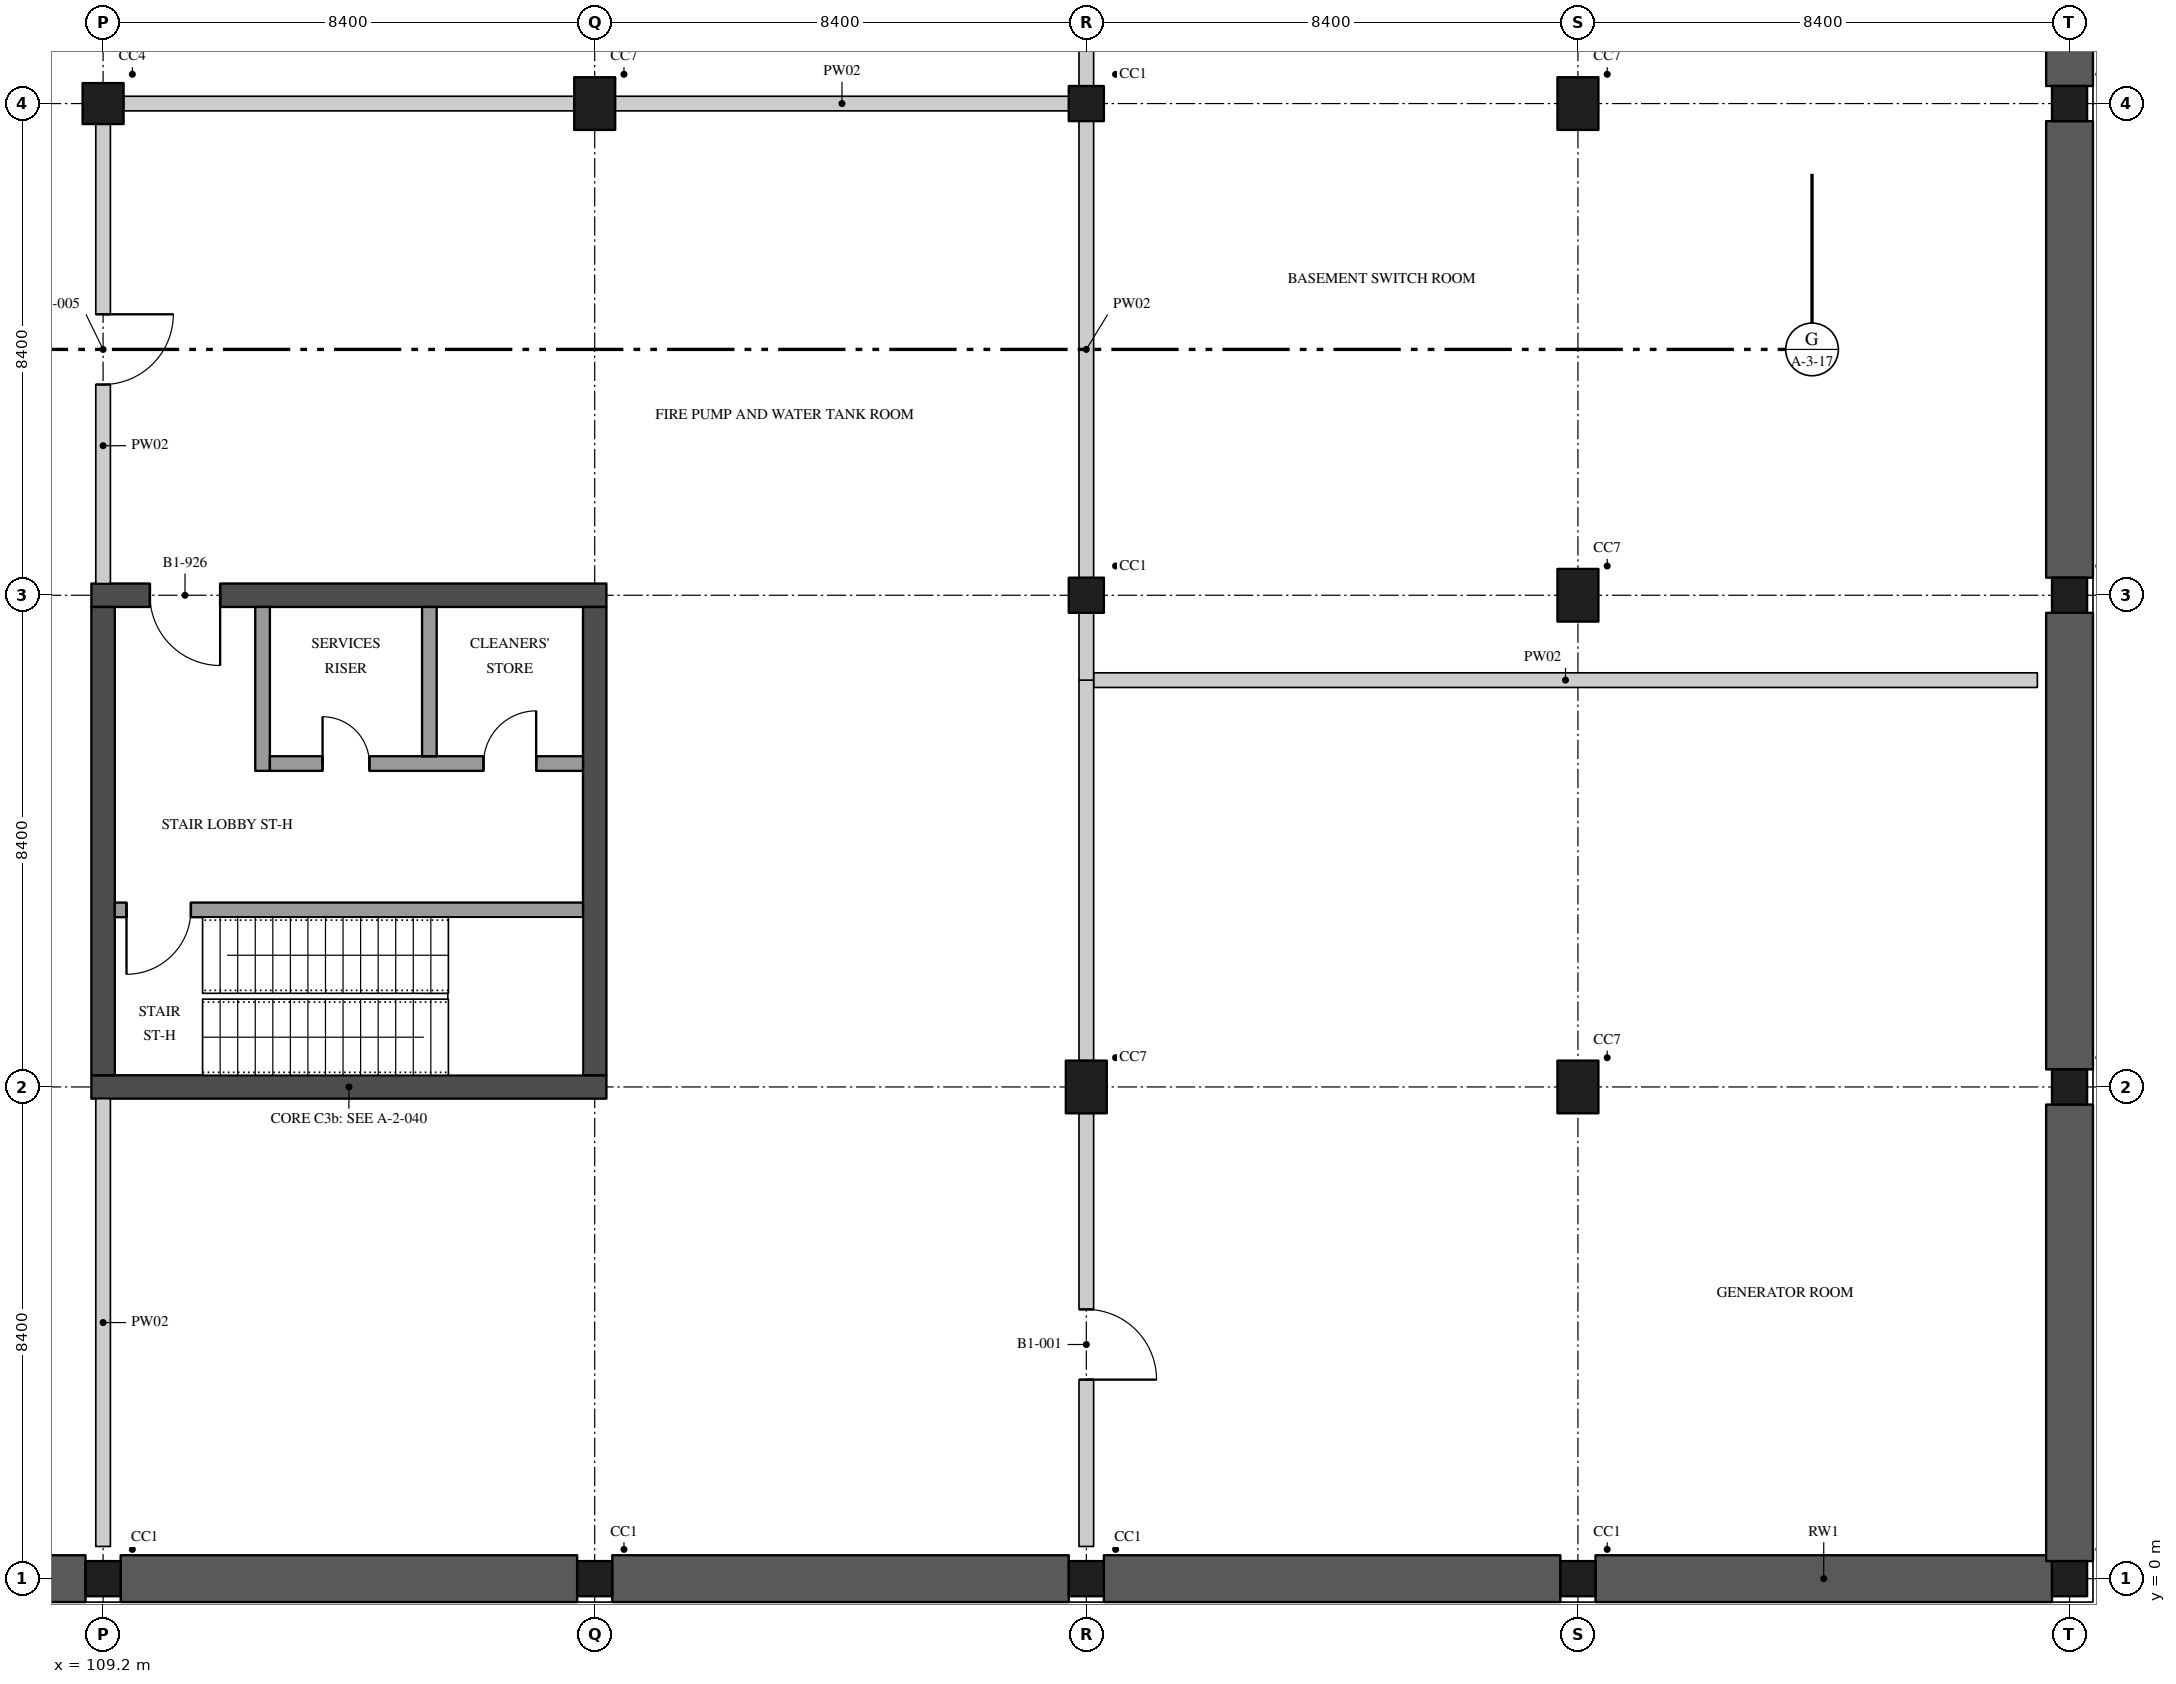
"""IFC4 building model, lengths in metres.
Left out: names, types, materials, properties, quantities, classifications, styles, units other than length and angle.
Written with IfcOpenShell. Run it as: python <this file> out.ifc"""

import sys

from ifc_helpers import new_model, si_unit, direction, frame, frame_2d, origin, origin_2d, place, context, subcontext, project, spatial, rectangle, extrude, element, fill, save


model = new_model("IFC4")
c1 = context("Model", 3, precision=1e-05, world=origin(), true_north=direction((0.0, 1.0)))
c2 = subcontext(c1, "Body", "Model", "MODEL_VIEW")
j1 = project(units=[si_unit("LENGTHUNIT", "METRE"), si_unit("PLANEANGLEUNIT", "RADIAN")], contexts=[c1])
p1 = place(None, origin())
s1 = spatial("IfcSite", under=j1, at=p1, CompositionType="ELEMENT")
p2 = place(p1, origin())
s2 = spatial("IfcBuilding", under=s1, at=p2, CompositionType="ELEMENT")
p3 = place(p2, frame((0.0, 0.0, -4.5)))
s3 = spatial("IfcBuildingStorey", under=s2, at=p3, CompositionType="ELEMENT", Elevation=-4.5)
p4 = place(p3, frame((109.2, 0.0, 0.0), z_axis=(0.0, 0.0, 1.0), x_axis=(1.0, 0.0, 0.0)))
e1 = element("IfcColumn", 1, at=p4, inside=s3, PredefinedType="COLUMN", context=c2, shape_type="SweptSolid", body=[
    extrude(rectangle(XDim=0.6, YDim=0.6, at=origin_2d()), origin(), (0.0, 0.0, 1.0), 4.05),
])
p5 = place(p3, frame((109.2, 25.2, 0.0), z_axis=(0.0, 0.0, 1.0), x_axis=(1.0, 0.0, 0.0)))
e2 = element("IfcColumn", 2, at=p5, inside=s3, PredefinedType="COLUMN", context=c2, shape_type="SweptSolid", body=[
    extrude(rectangle(XDim=0.7, YDim=0.7, at=origin_2d()), origin(), (0.0, 0.0, 1.0), 4.05),
])
p6 = place(p3, frame((117.6, 0.0, 0.0), z_axis=(0.0, 0.0, 1.0), x_axis=(1.0, 0.0, 0.0)))
e3 = element("IfcColumn", 3, at=p6, inside=s3, PredefinedType="COLUMN", context=c2, shape_type="SweptSolid", body=[
    extrude(rectangle(XDim=0.6, YDim=0.6, at=origin_2d()), origin(), (0.0, 0.0, 1.0), 4.05),
])
p7 = place(p3, frame((117.6, 25.2, 0.0), z_axis=(0.0, 0.0, 1.0), x_axis=(1.0, 0.0, 0.0)))
e4 = element("IfcColumn", 4, at=p7, inside=s3, PredefinedType="COLUMN", context=c2, shape_type="SweptSolid", body=[
    extrude(rectangle(XDim=0.7, YDim=0.9, at=origin_2d()), origin(), (0.0, 0.0, 1.0), 4.05),
])
p8 = place(p3, frame((126.0, 0.0, 0.0), z_axis=(0.0, 0.0, 1.0), x_axis=(1.0, 0.0, 0.0)))
e5 = element("IfcColumn", 5, at=p8, inside=s3, PredefinedType="COLUMN", context=c2, shape_type="SweptSolid", body=[
    extrude(rectangle(XDim=0.6, YDim=0.6, at=origin_2d()), origin(), (0.0, 0.0, 1.0), 4.05),
])
p9 = place(p3, frame((126.0, 8.4, 0.0), z_axis=(0.0, 0.0, 1.0), x_axis=(1.0, 0.0, 0.0)))
e6 = element("IfcColumn", 6, at=p9, inside=s3, PredefinedType="COLUMN", context=c2, shape_type="SweptSolid", body=[
    extrude(rectangle(XDim=0.7, YDim=0.9, at=origin_2d()), origin(), (0.0, 0.0, 1.0), 4.05),
])
for number, where, z_axis, x_axis in (
    (7, (126.0, 16.8, 0.0), (0.0, 0.0, 1.0), (1.0, 0.0, 0.0)),
    (8, (126.0, 25.2, 0.0), (0.0, 0.0, 1.0), (1.0, 0.0, 0.0)),
    (9, (134.4, 0.0, 0.0), (0.0, 0.0, 1.0), (1.0, 0.0, 0.0)),
):
    element("IfcColumn", number, at=place(p3, frame(where, z_axis=z_axis, x_axis=x_axis)), inside=s3, PredefinedType="COLUMN", context=c2, shape_type="SweptSolid", body=[
        extrude(rectangle(XDim=0.6, YDim=0.6, at=origin_2d()), origin(), (0.0, 0.0, 1.0), 4.05),
    ])
for number, where, z_axis, x_axis in (
    (10, (134.4, 8.4, 0.0), (0.0, 0.0, 1.0), (1.0, 0.0, 0.0)),
    (11, (134.4, 16.8, 0.0), (0.0, 0.0, 1.0), (1.0, 0.0, 0.0)),
    (12, (134.4, 25.2, 0.0), (0.0, 0.0, 1.0), (1.0, 0.0, 0.0)),
):
    element("IfcColumn", number, at=place(p3, frame(where, z_axis=z_axis, x_axis=x_axis)), inside=s3, PredefinedType="COLUMN", context=c2, shape_type="SweptSolid", body=[
        extrude(rectangle(XDim=0.7, YDim=0.9, at=origin_2d()), origin(), (0.0, 0.0, 1.0), 4.05),
    ])
for number, where, z_axis, x_axis in (
    (13, (142.8, 0.0, 0.0), (0.0, 0.0, 1.0), (1.0, 0.0, 0.0)),
    (14, (142.8, 8.4, 0.0), (0.0, 0.0, 1.0), (1.0, 0.0, 0.0)),
    (15, (142.8, 16.8, 0.0), (0.0, 0.0, 1.0), (1.0, 0.0, 0.0)),
    (16, (142.8, 25.2, 0.0), (0.0, 0.0, 1.0), (1.0, 0.0, 0.0)),
):
    element("IfcColumn", number, at=place(p3, frame(where, z_axis=z_axis, x_axis=x_axis)), inside=s3, PredefinedType="COLUMN", context=c2, shape_type="SweptSolid", body=[
        extrude(rectangle(XDim=0.6, YDim=0.6, at=origin_2d()), origin(), (0.0, 0.0, 1.0), 4.05),
    ])
p10 = place(p3, frame((101.1, 0.0, 0.0), z_axis=(0.0, 0.0, 1.0), x_axis=(1.0, 0.0, 0.0)))
e17 = element("IfcWall", 17, at=p10, inside=s3, PredefinedType="SOLIDWALL", context=c2, shape_type="SweptSolid", body=[
    extrude(rectangle(XDim=7.8, YDim=0.8, at=frame_2d((3.9, 0.0))), origin(), (0.0, 0.0, 1.0), 4.05),
])
for number, where, z_axis, x_axis in (
    (18, (109.5, 0.0, 0.0), (0.0, 0.0, 1.0), (1.0, 0.0, 0.0)),
    (19, (117.9, 0.0, 0.0), (0.0, 0.0, 1.0), (1.0, 0.0, 0.0)),
    (20, (126.3, 0.0, 0.0), (0.0, 0.0, 1.0), (1.0, 0.0, 0.0)),
    (21, (134.7, 0.0, 0.0), (0.0, 0.0, 1.0), (1.0, 0.0, 0.0)),
    (22, (142.8, 0.3, 0.0), (0.0, 0.0, 1.0), (0.0, 1.0, 0.0)),
    (23, (142.8, 8.7, 0.0), (0.0, 0.0, 1.0), (0.0, 1.0, 0.0)),
):
    element("IfcWall", number, at=place(p3, frame(where, z_axis=z_axis, x_axis=x_axis)), inside=s3, PredefinedType="SOLIDWALL", context=c2, shape_type="SweptSolid", body=[
        extrude(rectangle(XDim=7.8, YDim=0.8, at=frame_2d((3.9, 0.0))), origin(), (0.0, 0.0, 1.0), 4.05),
    ])
p11 = place(p3, frame((142.8, 17.1, 0.0), z_axis=(0.0, 0.0, 1.0), x_axis=(0.0, 1.0, 0.0)))
e24 = element("IfcWall", 24, at=p11, inside=s3, PredefinedType="SOLIDWALL", context=c2, shape_type="SweptSolid", body=[
    extrude(rectangle(XDim=7.8, YDim=0.8, at=frame_2d((3.9, 0.0))), origin(), (0.0, 0.0, 1.0), 4.05),
])
p12 = place(p3, frame((142.8, 25.5, 0.0), z_axis=(0.0, 0.0, 1.0), x_axis=(0.0, 1.0, 0.0)))
e25 = element("IfcWall", 25, at=p12, inside=s3, PredefinedType="SOLIDWALL", context=c2, shape_type="SweptSolid", body=[
    extrude(rectangle(XDim=7.8, YDim=0.8, at=frame_2d((3.9, 0.0))), origin(), (0.0, 0.0, 1.0), 4.05),
])
p13 = place(p3, frame((109.0, 8.4, 0.0), z_axis=(0.0, 0.0, 1.0), x_axis=(1.0, 0.0, 0.0)))
e26 = element("IfcWall", 26, at=p13, inside=s3, PredefinedType="SHEAR", context=c2, shape_type="SweptSolid", body=[
    extrude(rectangle(XDim=8.8, YDim=0.4, at=frame_2d((4.4, 0.0))), origin(), (0.0, 0.0, 1.0), 4.05),
])
p14 = place(p3, frame((109.0, 16.8, 0.0), z_axis=(0.0, 0.0, 1.0), x_axis=(1.0, 0.0, 0.0)))
e27 = element("IfcWall", 27, at=p14, inside=s3, PredefinedType="SHEAR", context=c2, shape_type="SweptSolid", body=[
    extrude(rectangle(XDim=8.8, YDim=0.4, at=frame_2d((4.4, 0.0))), origin(), (0.0, 0.0, 1.0), 4.05),
])
p15 = place(p14, frame((1.0, 0.0, 0.0)))
e28 = element("IfcOpeningElement", 28, at=p15, cuts=e27, PredefinedType="OPENING", context=c2, shape_type="SweptSolid", body=[
    extrude(rectangle(XDim=1.2, YDim=2.1, at=frame_2d((0.6, 1.05))), frame((0.0, 0.21, 0.0), z_axis=(0.0, -1.0, 0.0), x_axis=(1.0, 0.0, 0.0)), (0.0, 0.0, 1.0), 0.42),
])
for number, where, z_axis, x_axis in (
    (29, (109.2, 8.6, 0.0), (0.0, 0.0, 1.0), (0.0, 1.0, 0.0)),
    (30, (117.6, 8.6, 0.0), (0.0, 0.0, 1.0), (0.0, 1.0, 0.0)),
):
    element("IfcWall", number, at=place(p3, frame(where, z_axis=z_axis, x_axis=x_axis)), inside=s3, PredefinedType="SHEAR", context=c2, shape_type="SweptSolid", body=[
        extrude(rectangle(XDim=8.0, YDim=0.4, at=frame_2d((4.0, 0.0))), origin(), (0.0, 0.0, 1.0), 4.05),
    ])
p16 = place(p3, frame((109.4, 11.425, 0.0), z_axis=(0.0, 0.0, 1.0), x_axis=(1.0, 0.0, 0.0)))
e31 = element("IfcWall", 31, at=p16, inside=s3, PredefinedType="SOLIDWALL", context=c2, shape_type="SweptSolid", body=[
    extrude(rectangle(XDim=8.0, YDim=0.25, at=frame_2d((4.0, 0.0))), origin(), (0.0, 0.0, 1.0), 4.05),
])
p17 = place(p16, frame((0.2, 0.0, 0.0)))
e32 = element("IfcOpeningElement", 32, at=p17, cuts=e31, PredefinedType="OPENING", context=c2, shape_type="SweptSolid", body=[
    extrude(rectangle(XDim=1.1, YDim=2.1, at=frame_2d((0.55, 1.05))), frame((0.0, 0.135, 0.0), z_axis=(0.0, -1.0, 0.0), x_axis=(1.0, 0.0, 0.0)), (0.0, 0.0, 1.0), 0.27),
])
p18 = place(p3, frame((111.925, 13.8, 0.0), z_axis=(0.0, 0.0, 1.0), x_axis=(0.0, 1.0, 0.0)))
e33 = element("IfcWall", 33, at=p18, inside=s3, PredefinedType="SOLIDWALL", context=c2, shape_type="SweptSolid", body=[
    extrude(rectangle(XDim=2.8, YDim=0.25, at=frame_2d((1.4, 0.0))), origin(), (0.0, 0.0, 1.0), 4.05),
])
p19 = place(p3, frame((112.05, 13.925, 0.0), z_axis=(0.0, 0.0, 1.0), x_axis=(1.0, 0.0, 0.0)))
e34 = element("IfcWall", 34, at=p19, inside=s3, PredefinedType="SOLIDWALL", context=c2, shape_type="SweptSolid", body=[
    extrude(rectangle(XDim=5.35, YDim=0.25, at=frame_2d((2.675, 0.0))), origin(), (0.0, 0.0, 1.0), 4.05),
])
p20 = place(p19, frame((3.65, 0.0, 0.0)))
e35 = element("IfcOpeningElement", 35, at=p20, cuts=e34, PredefinedType="OPENING", context=c2, shape_type="SweptSolid", body=[
    extrude(rectangle(XDim=0.9, YDim=2.1, at=frame_2d((0.45, 1.05))), frame((0.0, 0.135, 0.0), z_axis=(0.0, -1.0, 0.0), x_axis=(1.0, 0.0, 0.0)), (0.0, 0.0, 1.0), 0.27),
])
p21 = place(p19, frame((0.9, 0.0, 0.0)))
e36 = element("IfcOpeningElement", 36, at=p21, cuts=e34, PredefinedType="OPENING", context=c2, shape_type="SweptSolid", body=[
    extrude(rectangle(XDim=0.8, YDim=2.1, at=frame_2d((0.4, 1.05))), frame((0.0, 0.135, 0.0), z_axis=(0.0, -1.0, 0.0), x_axis=(1.0, 0.0, 0.0)), (0.0, 0.0, 1.0), 0.27),
])
p22 = place(p3, frame((114.775, 14.05, 0.0), z_axis=(0.0, 0.0, 1.0), x_axis=(0.0, 1.0, 0.0)))
e37 = element("IfcWall", 37, at=p22, inside=s3, PredefinedType="SOLIDWALL", context=c2, shape_type="SweptSolid", body=[
    extrude(rectangle(XDim=2.55, YDim=0.25, at=frame_2d((1.275, 0.0))), origin(), (0.0, 0.0, 1.0), 4.05),
])
p23 = place(p3, frame((126.125, 15.35, 0.0), z_axis=(0.0, 0.0, 1.0), x_axis=(1.0, 0.0, 0.0)))
e38 = element("IfcWall", 38, at=p23, inside=s3, PredefinedType="PARTITIONING", context=c2, shape_type="SweptSolid", body=[
    extrude(rectangle(XDim=16.125, YDim=0.25, at=frame_2d((8.062, 0.0))), origin(), (0.0, 0.0, 1.0), 4.05),
])
p24 = place(p3, frame((126.0, 0.55, 0.0), z_axis=(0.0, 0.0, 1.0), x_axis=(0.0, 1.0, 0.0)))
e39 = element("IfcWall", 39, at=p24, inside=s3, PredefinedType="PARTITIONING", context=c2, shape_type="SweptSolid", body=[
    extrude(rectangle(XDim=7.4, YDim=0.25, at=frame_2d((3.7, 0.0))), origin(), (0.0, 0.0, 1.0), 4.05),
])
p25 = place(p24, frame((2.85, 0.0, 0.0)))
e40 = element("IfcOpeningElement", 40, at=p25, cuts=e39, PredefinedType="OPENING", context=c2, shape_type="SweptSolid", body=[
    extrude(rectangle(XDim=1.2, YDim=2.1, at=frame_2d((0.6, 1.05))), frame((0.0, 0.135, 0.0), z_axis=(0.0, -1.0, 0.0), x_axis=(1.0, 0.0, 0.0)), (0.0, 0.0, 1.0), 0.27),
])
p26 = place(p3, frame((126.0, 8.85, 0.0), z_axis=(0.0, 0.0, 1.0), x_axis=(0.0, 1.0, 0.0)))
e41 = element("IfcWall", 41, at=p26, inside=s3, PredefinedType="PARTITIONING", context=c2, shape_type="SweptSolid", body=[
    extrude(rectangle(XDim=6.5, YDim=0.25, at=frame_2d((3.25, 0.0))), origin(), (0.0, 0.0, 1.0), 4.05),
])
p27 = place(p3, frame((126.0, 15.35, 0.0), z_axis=(0.0, 0.0, 1.0), x_axis=(0.0, 1.0, 0.0)))
e42 = element("IfcWall", 42, at=p27, inside=s3, PredefinedType="PARTITIONING", context=c2, shape_type="SweptSolid", body=[
    extrude(rectangle(XDim=1.15, YDim=0.25, at=frame_2d((0.575, 0.0))), origin(), (0.0, 0.0, 1.0), 4.05),
])
p28 = place(p3, frame((126.0, 17.1, 0.0), z_axis=(0.0, 0.0, 1.0), x_axis=(0.0, 1.0, 0.0)))
e43 = element("IfcWall", 43, at=p28, inside=s3, PredefinedType="PARTITIONING", context=c2, shape_type="SweptSolid", body=[
    extrude(rectangle(XDim=7.8, YDim=0.25, at=frame_2d((3.9, 0.0))), origin(), (0.0, 0.0, 1.0), 4.05),
])
p29 = place(p3, frame((126.0, 25.5, 0.0), z_axis=(0.0, 0.0, 1.0), x_axis=(0.0, 1.0, 0.0)))
e44 = element("IfcWall", 44, at=p29, inside=s3, PredefinedType="PARTITIONING", context=c2, shape_type="SweptSolid", body=[
    extrude(rectangle(XDim=2.35, YDim=0.25, at=frame_2d((1.175, 0.0))), origin(), (0.0, 0.0, 1.0), 4.05),
])
p30 = place(p3, frame((109.2, 0.55, 0.0), z_axis=(0.0, 0.0, 1.0), x_axis=(0.0, 1.0, 0.0)))
e45 = element("IfcWall", 45, at=p30, inside=s3, PredefinedType="PARTITIONING", context=c2, shape_type="SweptSolid", body=[
    extrude(rectangle(XDim=7.65, YDim=0.25, at=frame_2d((3.825, 0.0))), origin(), (0.0, 0.0, 1.0), 4.05),
])
p31 = place(p3, frame((109.2, 17.0, 0.0), z_axis=(0.0, 0.0, 1.0), x_axis=(0.0, 1.0, 0.0)))
e46 = element("IfcWall", 46, at=p31, inside=s3, PredefinedType="PARTITIONING", context=c2, shape_type="SweptSolid", body=[
    extrude(rectangle(XDim=7.85, YDim=0.25, at=frame_2d((3.925, 0.0))), origin(), (0.0, 0.0, 1.0), 4.05),
])
p32 = place(p31, frame((3.4, 0.0, 0.0)))
e47 = element("IfcOpeningElement", 47, at=p32, cuts=e46, PredefinedType="OPENING", context=c2, shape_type="SweptSolid", body=[
    extrude(rectangle(XDim=1.2, YDim=2.1, at=frame_2d((0.6, 1.05))), frame((0.0, 0.135, 0.0), z_axis=(0.0, -1.0, 0.0), x_axis=(1.0, 0.0, 0.0)), (0.0, 0.0, 1.0), 0.27),
])
p33 = place(p3, frame((109.55, 25.2, 0.0), z_axis=(0.0, 0.0, 1.0), x_axis=(1.0, 0.0, 0.0)))
e48 = element("IfcWall", 48, at=p33, inside=s3, PredefinedType="PARTITIONING", context=c2, shape_type="SweptSolid", body=[
    extrude(rectangle(XDim=7.7, YDim=0.25, at=frame_2d((3.85, 0.0))), origin(), (0.0, 0.0, 1.0), 4.05),
])
p34 = place(p3, frame((117.95, 25.2, 0.0), z_axis=(0.0, 0.0, 1.0), x_axis=(1.0, 0.0, 0.0)))
e49 = element("IfcWall", 49, at=p34, inside=s3, PredefinedType="PARTITIONING", context=c2, shape_type="SweptSolid", body=[
    extrude(rectangle(XDim=7.75, YDim=0.25, at=frame_2d((3.875, 0.0))), origin(), (0.0, 0.0, 1.0), 4.05),
])
p35 = place(p20, origin())
e50 = element("IfcDoor", 50, at=p35, inside=s3, OperationType="SINGLE_SWING_LEFT", PredefinedType="DOOR", context=c2, shape_type="SweptSolid", body=[
    extrude(rectangle(XDim=0.9, YDim=2.1, at=frame_2d((0.45, 1.05))), frame((0.0, 0.035, 0.0), z_axis=(0.0, -1.0, 0.0), x_axis=(1.0, 0.0, 0.0)), (0.0, 0.0, 1.0), 0.07),
])
fill(e35, e50)
p36 = place(p15, frame((1.2, 0.0, 0.0), z_axis=(0.0, 0.0, 1.0), x_axis=(-1.0, 0.0, 0.0)))
e51 = element("IfcDoor", 51, at=p36, inside=s3, OperationType="SINGLE_SWING_RIGHT", PredefinedType="DOOR", context=c2, shape_type="SweptSolid", body=[
    extrude(rectangle(XDim=1.2, YDim=2.1, at=frame_2d((0.6, 1.05))), frame((0.0, 0.035, 0.0), z_axis=(0.0, -1.0, 0.0), x_axis=(1.0, 0.0, 0.0)), (0.0, 0.0, 1.0), 0.07),
])
fill(e28, e51)
p37 = place(p21, origin())
e52 = element("IfcDoor", 52, at=p37, inside=s3, OperationType="SINGLE_SWING_RIGHT", PredefinedType="DOOR", context=c2, shape_type="SweptSolid", body=[
    extrude(rectangle(XDim=0.8, YDim=2.1, at=frame_2d((0.4, 1.05))), frame((0.0, 0.035, 0.0), z_axis=(0.0, -1.0, 0.0), x_axis=(1.0, 0.0, 0.0)), (0.0, 0.0, 1.0), 0.07),
])
fill(e36, e52)
p38 = place(p17, frame((1.1, 0.0, 0.0), z_axis=(0.0, 0.0, 1.0), x_axis=(-1.0, 0.0, 0.0)))
e53 = element("IfcDoor", 53, at=p38, inside=s3, OperationType="SINGLE_SWING_LEFT", PredefinedType="DOOR", context=c2, shape_type="SweptSolid", body=[
    extrude(rectangle(XDim=1.1, YDim=2.1, at=frame_2d((0.55, 1.05))), frame((0.0, 0.035, 0.0), z_axis=(0.0, -1.0, 0.0), x_axis=(1.0, 0.0, 0.0)), (0.0, 0.0, 1.0), 0.07),
])
fill(e32, e53)
p39 = place(p25, frame((1.2, 0.0, 0.0), z_axis=(0.0, 0.0, 1.0), x_axis=(-1.0, 0.0, 0.0)))
e54 = element("IfcDoor", 54, at=p39, inside=s3, OperationType="SINGLE_SWING_LEFT", PredefinedType="DOOR", context=c2, shape_type="SweptSolid", body=[
    extrude(rectangle(XDim=1.2, YDim=2.1, at=frame_2d((0.6, 1.05))), frame((0.0, 0.05, 0.0), z_axis=(0.0, -1.0, 0.0), x_axis=(1.0, 0.0, 0.0)), (0.0, 0.0, 1.0), 0.1),
])
fill(e40, e54)
p40 = place(p32, frame((1.2, 0.0, 0.0), z_axis=(0.0, 0.0, 1.0), x_axis=(-1.0, 0.0, 0.0)))
e55 = element("IfcDoor", 55, at=p40, inside=s3, OperationType="SINGLE_SWING_RIGHT", PredefinedType="DOOR", context=c2, shape_type="SweptSolid", body=[
    extrude(rectangle(XDim=1.2, YDim=2.1, at=frame_2d((0.6, 1.05))), frame((0.0, 0.05, 0.0), z_axis=(0.0, -1.0, 0.0), x_axis=(1.0, 0.0, 0.0)), (0.0, 0.0, 1.0), 0.1),
])
fill(e47, e55)
save(model, sys.argv[1])
